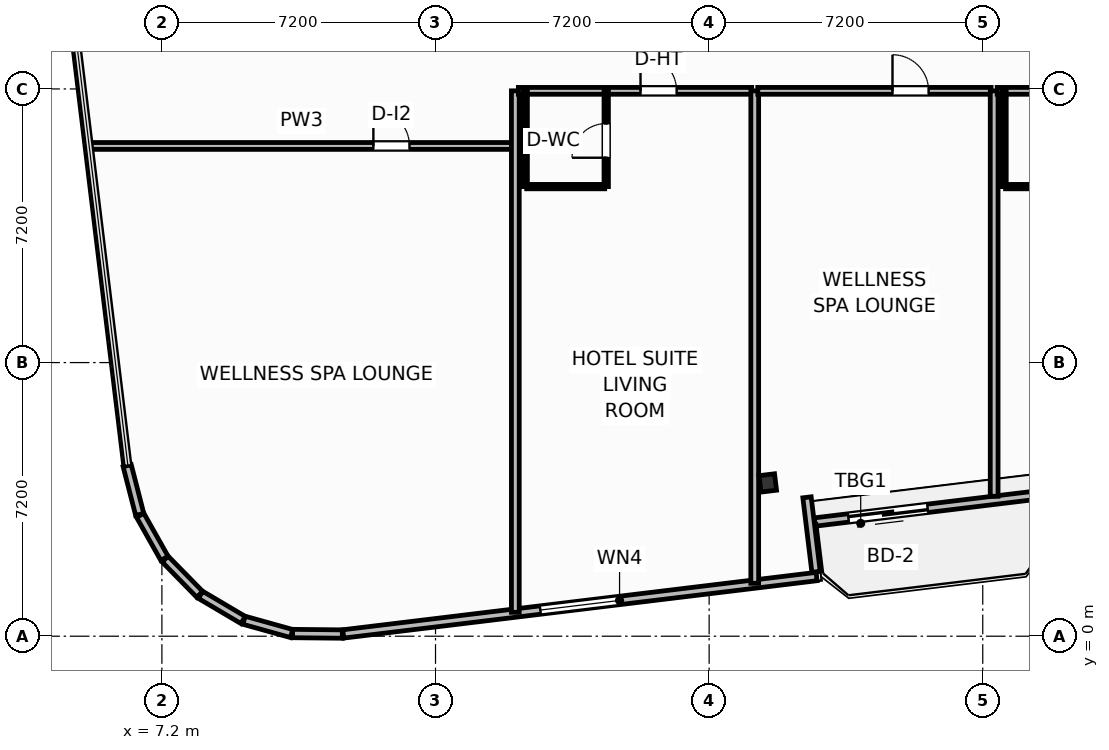
"""IFC4 building model, lengths in metres.
Left out: names, types, materials, properties, quantities, classifications, styles, units other than length and angle.
Written with IfcOpenShell. Run it as: python <this file> out.ifc"""

import sys

from ifc_helpers import new_model, si_unit, direction, frame, frame_2d, origin, origin_2d, place, context, subcontext, project, spatial, rectangle, i_section, extrude, element, fill, save


model = new_model("IFC4")
c1 = context("Model", 3, precision=1e-05, world=origin(), true_north=direction((0.0, 1.0)))
c2 = subcontext(c1, "Body", "Model", "MODEL_VIEW")
j1 = project(units=[si_unit("LENGTHUNIT", "METRE"), si_unit("PLANEANGLEUNIT", "RADIAN")], contexts=[c1])
p1 = place(None, origin())
s1 = spatial("IfcSite", under=j1, at=p1, CompositionType="ELEMENT")
p2 = place(p1, origin())
s2 = spatial("IfcBuilding", under=s1, at=p2, CompositionType="ELEMENT")
p3 = place(p2, frame((0.0, 0.0, 204.2)))
s3 = spatial("IfcBuildingStorey", under=s2, at=p3, CompositionType="ELEMENT", Elevation=204.2)
p4 = place(p3, frame((23.143, 4.033, 0.0), z_axis=(0.0, 0.0, 1.0), x_axis=(0.992732158755, 0.12034475881, 0.0)))
e1 = element("IfcColumn", 1, at=p4, inside=s3, PredefinedType="COLUMN", context=c2, shape_type="SweptSolid", body=[
    extrude(i_section(OverallWidth=0.412, OverallDepth=0.435, WebThickness=0.036, FlangeThickness=0.057, FilletRadius=0.025, at=origin_2d()), origin(), (0.0, 0.0, 1.0), 3.7),
])
p5 = place(p3, frame((30.332, 3.726, 0.0), z_axis=(0.0, 0.0, 1.0), x_axis=(-0.992729951822, -0.120362962556, 0.0)))
e2 = element("IfcWall", 2, at=p5, inside=s3, PredefinedType="SOLIDWALL", context=c2, shape_type="SweptSolid", body=[
    extrude(rectangle(XDim=6.0, YDim=0.22, at=frame_2d((3.0, 0.0))), origin(), (0.0, 0.0, 1.0), 2.66),
])
p6 = place(p5, frame((3.004, 0.0, 0.0)))
e3 = element("IfcOpeningElement", 3, at=p6, cuts=e2, PredefinedType="OPENING", context=c2, shape_type="SweptSolid", body=[
    extrude(rectangle(XDim=2.1, YDim=2.3, at=frame_2d((1.05, 1.15))), frame((0.0, 0.12, 0.0), z_axis=(0.0, -1.0, 0.0), x_axis=(1.0, 0.0, 0.0)), (0.0, 0.0, 1.0), 0.24),
])
p7 = place(p3, frame((6.286, 4.488, 0.0), z_axis=(0.0, 0.0, 1.0), x_axis=(0.248942347653, -0.968518305219, 0.0)))
e4 = element("IfcWall", 4, at=p7, inside=s3, PredefinedType="SOLIDWALL", context=c2, shape_type="SweptSolid", body=[
    extrude(rectangle(XDim=1.326, YDim=0.22, at=frame_2d((0.663, 0.0))), origin(), (0.0, 0.0, 1.0), 2.66),
])
for number, where, z_axis, x_axis in (
    (5, (6.629, 3.182, 0.0), (0.0, 0.0, 1.0), (0.491, -0.871, 0.0)),
    (6, (7.285, 2.031, 0.0), (0.0, 0.0, 1.0), (0.7, -0.714, 0.0)),
    (7, (8.217, 1.089, 0.0), (0.0, 0.0, 1.0), (0.861, -0.509, 0.0)),
):
    element("IfcWall", number, at=place(p3, frame(where, z_axis=z_axis, x_axis=x_axis)), inside=s3, PredefinedType="SOLIDWALL", context=c2, shape_type="SweptSolid", body=[
        extrude(rectangle(XDim=1.301, YDim=0.22, at=frame_2d((0.65, 0.0))), origin(), (0.0, 0.0, 1.0), 2.66),
    ])
p8 = place(p3, frame((9.361, 0.42, 0.0), z_axis=(0.0, 0.0, 1.0), x_axis=(0.963218895288, -0.268717992997, 0.0)))
e8 = element("IfcWall", 8, at=p8, inside=s3, PredefinedType="SOLIDWALL", context=c2, shape_type="SweptSolid", body=[
    extrude(rectangle(XDim=1.301, YDim=0.22, at=frame_2d((0.65, 0.0))), origin(), (0.0, 0.0, 1.0), 2.66),
])
p9 = place(p3, frame((10.639, 0.07, 0.0), z_axis=(0.0, 0.0, 1.0), x_axis=(0.999947377741, -0.010258740119, 0.0)))
e9 = element("IfcWall", 9, at=p9, inside=s3, PredefinedType="SOLIDWALL", context=c2, shape_type="SweptSolid", body=[
    extrude(rectangle(XDim=1.309, YDim=0.22, at=frame_2d((0.654, 0.0))), origin(), (0.0, 0.0, 1.0), 2.66),
])
p10 = place(p3, frame((11.972, 0.06, 0.0), z_axis=(0.0, 0.0, 1.0), x_axis=(0.992732021049, 0.120345894751, 0.0)))
e10 = element("IfcWall", 10, at=p10, inside=s3, PredefinedType="SOLIDWALL", context=c2, shape_type="SweptSolid", body=[
    extrude(rectangle(XDim=12.547, YDim=0.22, at=frame_2d((6.274, 0.0))), origin(), (0.0, 0.0, 1.0), 2.66),
])
p11 = place(p10, frame((5.224, 0.0, 0.8)))
e11 = element("IfcOpeningElement", 11, at=p11, cuts=e10, PredefinedType="OPENING", context=c2, shape_type="SweptSolid", body=[
    extrude(rectangle(XDim=2.1, YDim=1.75, at=frame_2d((1.05, 0.875))), frame((0.0, 0.12, 0.0), z_axis=(0.0, -1.0, 0.0), x_axis=(1.0, 0.0, 0.0)), (0.0, 0.0, 1.0), 0.24),
])
p12 = place(p3, frame((24.413, 1.694, 0.0), z_axis=(0.0, 0.0, 1.0), x_axis=(-0.120290754542, 0.992738703976, 0.0)))
e12 = element("IfcWall", 12, at=p12, inside=s3, PredefinedType="SOLIDWALL", context=c2, shape_type="SweptSolid", body=[
    extrude(rectangle(XDim=1.975, YDim=0.22, at=frame_2d((0.987, 0.0))), origin(), (0.0, 0.0, 1.0), 2.66),
])
p13 = place(p3, frame((5.326, 12.9, 0.0), z_axis=(0.0, 0.0, 1.0), x_axis=(1.0, 0.0, 0.0)))
e13 = element("IfcWall", 13, at=p13, inside=s3, PredefinedType="PARTITIONING", context=c2, shape_type="SweptSolid", body=[
    extrude(rectangle(XDim=11.094, YDim=0.18, at=frame_2d((5.547, 0.0))), origin(), (0.0, 0.0, 1.0), 3.38),
])
p14 = place(p13, frame((7.439, 0.0, 0.0)))
e14 = element("IfcOpeningElement", 14, at=p14, cuts=e13, PredefinedType="OPENING", context=c2, shape_type="SweptSolid", body=[
    extrude(rectangle(XDim=0.95, YDim=2.05, at=frame_2d((0.475, 1.025))), frame((0.0, 0.1, 0.0), z_axis=(0.0, -1.0, 0.0), x_axis=(1.0, 0.0, 0.0)), (0.0, 0.0, 1.0), 0.2),
])
p15 = place(p3, frame((16.5, 0.629, 0.0), z_axis=(0.0, 0.0, 1.0), x_axis=(0.0, 1.0, 0.0)))
e15 = element("IfcWall", 15, at=p15, inside=s3, PredefinedType="PARTITIONING", context=c2, shape_type="SweptSolid", body=[
    extrude(rectangle(XDim=13.721, YDim=0.205, at=frame_2d((6.861, 0.0))), origin(), (0.0, 0.0, 1.0), 3.38),
])
p16 = place(p3, frame((16.58, 14.35, 0.0), z_axis=(0.0, 0.0, 1.0), x_axis=(1.0, 0.0, 0.0)))
e16 = element("IfcWall", 16, at=p16, inside=s3, PredefinedType="PARTITIONING", context=c2, shape_type="SweptSolid", body=[
    extrude(rectangle(XDim=6.14, YDim=0.18, at=frame_2d((3.07, 0.0))), origin(), (0.0, 0.0, 1.0), 3.38),
])
p17 = place(p16, frame((3.214, 0.0, 0.0)))
e17 = element("IfcOpeningElement", 17, at=p17, cuts=e16, PredefinedType="OPENING", context=c2, shape_type="SweptSolid", body=[
    extrude(rectangle(XDim=0.95, YDim=2.15, at=frame_2d((0.475, 1.075))), frame((0.0, 0.1, 0.0), z_axis=(0.0, -1.0, 0.0), x_axis=(1.0, 0.0, 0.0)), (0.0, 0.0, 1.0), 0.2),
])
p18 = place(p3, frame((16.8, 11.83, 0.0), z_axis=(0.0, 0.0, 1.0), x_axis=(1.0, 0.0, 0.0)))
e18 = element("IfcWall", 18, at=p18, inside=s3, PredefinedType="PARTITIONING", context=c2, shape_type="SweptSolid", body=[
    extrude(rectangle(XDim=2.052, YDim=0.115, at=frame_2d((1.026, 0.0))), origin(), (0.0, 0.0, 1.0), 3.38),
])
p19 = place(p3, frame((18.892, 11.83, 0.0), z_axis=(0.0, 0.0, 1.0), x_axis=(0.0, 1.0, 0.0)))
e19 = element("IfcWall", 19, at=p19, inside=s3, PredefinedType="PARTITIONING", context=c2, shape_type="SweptSolid", body=[
    extrude(rectangle(XDim=2.52, YDim=0.115, at=frame_2d((1.26, 0.0))), origin(), (0.0, 0.0, 1.0), 3.38),
])
p20 = place(p19, frame((0.76, 0.0, 0.0)))
e20 = element("IfcOpeningElement", 20, at=p20, cuts=e19, PredefinedType="OPENING", context=c2, shape_type="SweptSolid", body=[
    extrude(rectangle(XDim=0.9, YDim=2.05, at=frame_2d((0.45, 1.025))), frame((0.0, 0.067, 0.0), z_axis=(0.0, -1.0, 0.0), x_axis=(1.0, 0.0, 0.0)), (0.0, 0.0, 1.0), 0.135),
])
p21 = place(p3, frame((16.76, 11.83, 0.0), z_axis=(0.0, 0.0, 1.0), x_axis=(0.0, 1.0, 0.0)))
e21 = element("IfcWall", 21, at=p21, inside=s3, PredefinedType="PARTITIONING", context=c2, shape_type="SweptSolid", body=[
    extrude(rectangle(XDim=2.52, YDim=0.115, at=frame_2d((1.26, 0.0))), origin(), (0.0, 0.0, 1.0), 3.38),
])
p22 = place(p3, frame((22.8, 1.393, 0.0), z_axis=(0.0, 0.0, 1.0), x_axis=(0.0, 1.0, 0.0)))
e22 = element("IfcWall", 22, at=p22, inside=s3, PredefinedType="PARTITIONING", context=c2, shape_type="SweptSolid", body=[
    extrude(rectangle(XDim=12.958, YDim=0.205, at=frame_2d((6.479, 0.0))), origin(), (0.0, 0.0, 1.0), 1.165),
])
p23 = place(p3, frame((22.88, 14.35, 0.0), z_axis=(0.0, 0.0, 1.0), x_axis=(1.0, 0.0, 0.0)))
e23 = element("IfcWall", 23, at=p23, inside=s3, PredefinedType="PARTITIONING", context=c2, shape_type="SweptSolid", body=[
    extrude(rectangle(XDim=6.14, YDim=0.18, at=frame_2d((3.07, 0.0))), origin(), (0.0, 0.0, 1.0), 3.38),
])
p24 = place(p23, frame((3.545, 0.0, 0.0)))
e24 = element("IfcOpeningElement", 24, at=p24, cuts=e23, PredefinedType="OPENING", context=c2, shape_type="SweptSolid", body=[
    extrude(rectangle(XDim=0.95, YDim=2.05, at=frame_2d((0.475, 1.025))), frame((0.0, 0.1, 0.0), z_axis=(0.0, -1.0, 0.0), x_axis=(1.0, 0.0, 0.0)), (0.0, 0.0, 1.0), 0.2),
])
p25 = place(p3, frame((29.1, 3.682, 0.0), z_axis=(0.0, 0.0, 1.0), x_axis=(0.0, 1.0, 0.0)))
e25 = element("IfcWall", 25, at=p25, inside=s3, PredefinedType="PARTITIONING", context=c2, shape_type="SweptSolid", body=[
    extrude(rectangle(XDim=10.668, YDim=0.205, at=frame_2d((5.334, 0.0))), origin(), (0.0, 0.0, 1.0), 3.38),
])
p26 = place(p3, frame((29.18, 14.35, 0.0), z_axis=(0.0, 0.0, 1.0), x_axis=(1.0, 0.0, 0.0)))
e26 = element("IfcWall", 26, at=p26, inside=s3, PredefinedType="PARTITIONING", context=c2, shape_type="SweptSolid", body=[
    extrude(rectangle(XDim=6.14, YDim=0.18, at=frame_2d((3.07, 0.0))), origin(), (0.0, 0.0, 1.0), 3.38),
])
p27 = place(p26, frame((2.512, 0.0, 0.0)))
e27 = element("IfcOpeningElement", 27, at=p27, cuts=e26, PredefinedType="OPENING", context=c2, shape_type="SweptSolid", body=[
    extrude(rectangle(XDim=0.95, YDim=2.15, at=frame_2d((0.475, 1.075))), frame((0.0, 0.1, 0.0), z_axis=(0.0, -1.0, 0.0), x_axis=(1.0, 0.0, 0.0)), (0.0, 0.0, 1.0), 0.2),
])
p28 = place(p3, frame((29.4, 11.83, 0.0), z_axis=(0.0, 0.0, 1.0), x_axis=(1.0, 0.0, 0.0)))
e28 = element("IfcWall", 28, at=p28, inside=s3, PredefinedType="PARTITIONING", context=c2, shape_type="SweptSolid", body=[
    extrude(rectangle(XDim=2.052, YDim=0.115, at=frame_2d((1.026, 0.0))), origin(), (0.0, 0.0, 1.0), 3.38),
])
p29 = place(p3, frame((29.36, 11.83, 0.0), z_axis=(0.0, 0.0, 1.0), x_axis=(0.0, 1.0, 0.0)))
e29 = element("IfcWall", 29, at=p29, inside=s3, PredefinedType="PARTITIONING", context=c2, shape_type="SweptSolid", body=[
    extrude(rectangle(XDim=2.52, YDim=0.115, at=frame_2d((1.26, 0.0))), origin(), (0.0, 0.0, 1.0), 3.38),
])
p30 = place(p6, origin())
e30 = element("IfcDoor", 30, at=p30, inside=s3, OperationType="SLIDING_TO_LEFT", PredefinedType="DOOR", context=c2, shape_type="SweptSolid", body=[
    extrude(rectangle(XDim=2.1, YDim=2.3, at=frame_2d((1.05, 1.15))), frame((0.0, 0.025, 0.0), z_axis=(0.0, -1.0, 0.0), x_axis=(1.0, 0.0, 0.0)), (0.0, 0.0, 1.0), 0.05),
])
fill(e3, e30)
p31 = place(p11, origin())
e31 = element("IfcWindow", 31, at=p31, inside=s3, PartitioningType="SINGLE_PANEL", PredefinedType="WINDOW", context=c2, shape_type="SweptSolid", body=[
    extrude(rectangle(XDim=2.1, YDim=1.75, at=frame_2d((1.05, 0.875))), frame((0.0, 0.03, 0.0), z_axis=(0.0, -1.0, 0.0), x_axis=(1.0, 0.0, 0.0)), (0.0, 0.0, 1.0), 0.06),
])
fill(e11, e31)
p32 = place(p14, origin())
e32 = element("IfcDoor", 32, at=p32, inside=s3, OperationType="SINGLE_SWING_LEFT", PredefinedType="DOOR", context=c2, shape_type="SweptSolid", body=[
    extrude(rectangle(XDim=0.95, YDim=2.05, at=frame_2d((0.475, 1.025))), frame((0.0, 0.025, 0.0), z_axis=(0.0, -1.0, 0.0), x_axis=(1.0, 0.0, 0.0)), (0.0, 0.0, 1.0), 0.05),
])
fill(e14, e32)
p33 = place(p17, origin())
e33 = element("IfcDoor", 33, at=p33, inside=s3, OperationType="SINGLE_SWING_LEFT", PredefinedType="DOOR", context=c2, shape_type="SweptSolid", body=[
    extrude(rectangle(XDim=0.95, YDim=2.15, at=frame_2d((0.475, 1.075))), frame((0.0, 0.025, 0.0), z_axis=(0.0, -1.0, 0.0), x_axis=(1.0, 0.0, 0.0)), (0.0, 0.0, 1.0), 0.05),
])
fill(e17, e33)
p34 = place(p20, origin())
e34 = element("IfcDoor", 34, at=p34, inside=s3, OperationType="SINGLE_SWING_LEFT", PredefinedType="DOOR", context=c2, shape_type="SweptSolid", body=[
    extrude(rectangle(XDim=0.9, YDim=2.05, at=frame_2d((0.45, 1.025))), frame((0.0, 0.025, 0.0), z_axis=(0.0, -1.0, 0.0), x_axis=(1.0, 0.0, 0.0)), (0.0, 0.0, 1.0), 0.05),
])
fill(e20, e34)
p35 = place(p24, origin())
e35 = element("IfcDoor", 35, at=p35, inside=s3, OperationType="SINGLE_SWING_LEFT", PredefinedType="DOOR", context=c2, shape_type="SweptSolid", body=[
    extrude(rectangle(XDim=0.95, YDim=2.05, at=frame_2d((0.475, 1.025))), frame((0.0, 0.025, 0.0), z_axis=(0.0, -1.0, 0.0), x_axis=(1.0, 0.0, 0.0)), (0.0, 0.0, 1.0), 0.05),
])
fill(e24, e35)
save(model, sys.argv[1])
